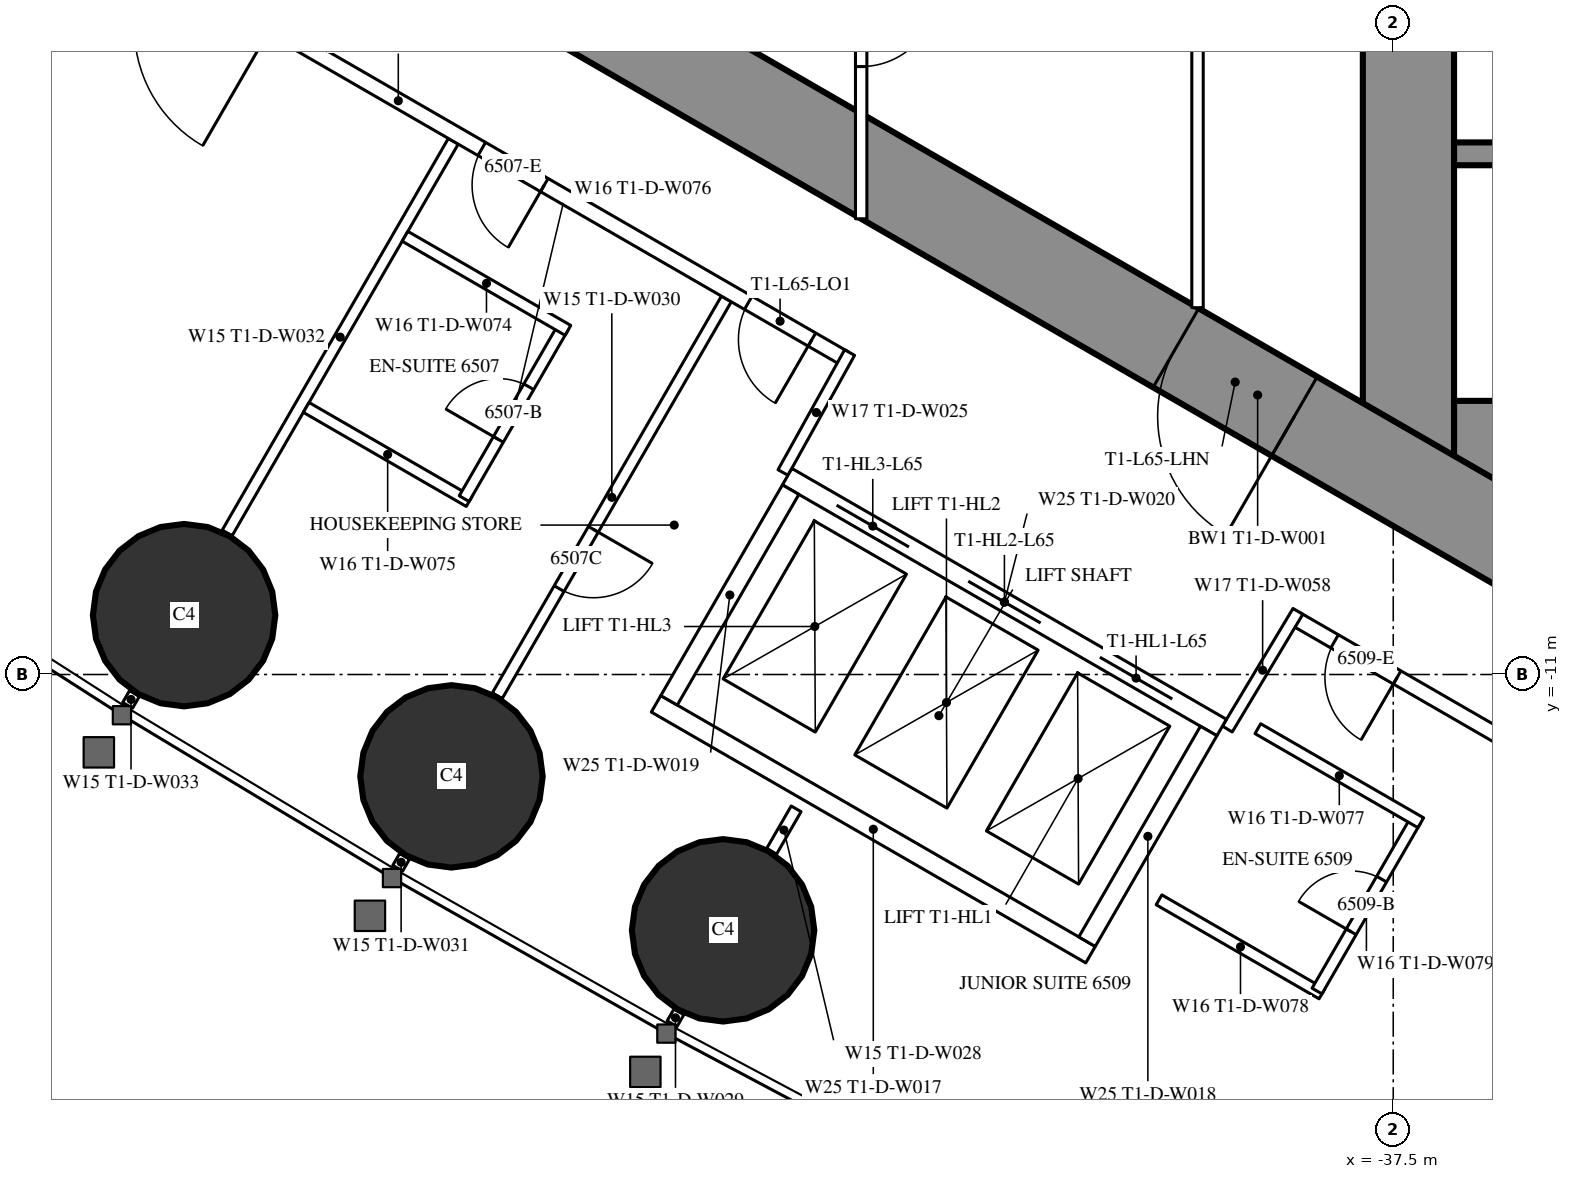
"""IFC4 building model, lengths in metres.
Left out: names, types, materials, properties, quantities, classifications, styles, units other than length and angle.
Written with IfcOpenShell. Run it as: python <this file> out.ifc"""

import sys

from ifc_helpers import new_model, si_unit, direction, frame, frame_2d, origin, origin_2d, place, context, subcontext, project, spatial, rectangle, circle, extrude, element, fill, save


model = new_model("IFC4")
c1 = context("Model", 3, precision=1e-05, world=origin(), true_north=direction((0.0, 1.0)))
c2 = subcontext(c1, "Body", "Model", "MODEL_VIEW")
j1 = project(units=[si_unit("LENGTHUNIT", "METRE"), si_unit("PLANEANGLEUNIT", "RADIAN")], contexts=[c1])
p1 = place(None, origin())
s1 = spatial("IfcSite", under=j1, at=p1, CompositionType="ELEMENT")
p2 = place(p1, origin())
s2 = spatial("IfcBuilding", under=s1, at=p2, CompositionType="ELEMENT")
p3 = place(p2, frame((0.0, 0.0, 244.1)))
s3 = spatial("IfcBuildingStorey", under=s2, at=p3, CompositionType="ELEMENT", Elevation=244.1)
for number, where, z_axis, x_axis in (
    (1, (-53.408, -10.219, 0.0), (0.0, 0.0, 1.0), (1.0, 0.0, 0.0)),
    (2, (-49.89, -12.34, 0.0), (0.0, 0.0, 1.0), (1.0, 0.0, 0.0)),
    (3, (-46.317, -14.365, 0.0), (0.0, 0.0, 1.0), (1.0, 0.0, 0.0)),
):
    element("IfcColumn", number, at=place(p3, frame(where, z_axis=z_axis, x_axis=x_axis)), inside=s3, PredefinedType="COLUMN", context=c2, shape_type="SweptSolid", body=[
        extrude(circle(Radius=1.2, at=origin_2d()), origin(), (0.0, 0.0, 1.0), 3.6),
    ])
p4 = place(p3, frame((-37.3, 8.6, 0.0), z_axis=(0.0, 0.0, 1.0), x_axis=(0.0, -1.0, 0.0)))
e4 = element("IfcWall", 4, at=p4, inside=s3, PredefinedType="SHEAR", context=c2, shape_type="SweptSolid", body=[
    extrude(rectangle(XDim=17.2, YDim=1.2, at=frame_2d((8.6, 0.0))), origin(), (0.0, 0.0, 1.0), 3.6),
])
p5 = place(p4, frame((7.7, 0.0, 0.0)))
e5 = element("IfcOpeningElement", 5, at=p5, cuts=e4, PredefinedType="OPENING", context=c2, shape_type="SweptSolid", body=[
    extrude(rectangle(XDim=1.8, YDim=2.2, at=frame_2d((0.9, 1.1))), frame((0.0, 0.61, 0.0), z_axis=(0.0, -1.0, 0.0), x_axis=(1.0, 0.0, 0.0)), (0.0, 0.0, 1.0), 1.22),
])
p6 = place(p3, frame((-28.3, -8.0, 0.0), z_axis=(0.0, 0.0, 1.0), x_axis=(-1.0, 0.0, 0.0)))
e6 = element("IfcWall", 6, at=p6, inside=s3, PredefinedType="SHEAR", context=c2, shape_type="SweptSolid", body=[
    extrude(rectangle(XDim=8.4, YDim=1.2, at=frame_2d((4.2, 0.0))), origin(), (0.0, 0.0, 1.0), 3.6),
])
p7 = place(p6, frame((0.25, 0.0, 0.0)))
e7 = element("IfcOpeningElement", 7, at=p7, cuts=e6, PredefinedType="OPENING", context=c2, shape_type="SweptSolid", body=[
    extrude(rectangle(XDim=1.0, YDim=2.2, at=frame_2d((0.5, 1.1))), frame((0.0, 0.61, 0.0), z_axis=(0.0, -1.0, 0.0), x_axis=(1.0, 0.0, 0.0)), (0.0, 0.0, 1.0), 1.22),
])
p8 = place(p3, frame((-28.3, -4.15, 0.0), z_axis=(0.0, 0.0, 1.0), x_axis=(-1.0, 0.0, 0.0)))
e8 = element("IfcWall", 8, at=p8, inside=s3, PredefinedType="SHEAR", context=c2, shape_type="SweptSolid", body=[
    extrude(rectangle(XDim=8.4, YDim=0.3, at=frame_2d((4.2, 0.0))), origin(), (0.0, 0.0, 1.0), 3.6),
])
p9 = place(p3, frame((-27.2, -14.3, 0.0), z_axis=(0.0, 0.0, 1.0), x_axis=(-0.866024021859, 0.500002393557, 0.0)))
e9 = element("IfcWall", 9, at=p9, inside=s3, PredefinedType="SHEAR", context=c2, shape_type="SweptSolid", body=[
    extrude(rectangle(XDim=27.907, YDim=1.2, at=frame_2d((13.954, 0.0))), origin(), (0.0, 0.0, 1.0), 3.6),
])
p10 = place(p9, frame((4.6, 0.0, 0.0)))
e10 = element("IfcOpeningElement", 10, at=p10, cuts=e9, PredefinedType="OPENING", context=c2, shape_type="SweptSolid", body=[
    extrude(rectangle(XDim=1.0, YDim=2.2, at=frame_2d((0.5, 1.1))), frame((0.0, 0.61, 0.0), z_axis=(0.0, -1.0, 0.0), x_axis=(1.0, 0.0, 0.0)), (0.0, 0.0, 1.0), 1.22),
])
p11 = place(p9, frame((13.395, 0.0, 0.0)))
e11 = element("IfcOpeningElement", 11, at=p11, cuts=e9, PredefinedType="OPENING", context=c2, shape_type="SweptSolid", body=[
    extrude(rectangle(XDim=1.8, YDim=2.2, at=frame_2d((0.9, 1.1))), frame((0.0, 0.61, 0.0), z_axis=(0.0, -1.0, 0.0), x_axis=(1.0, 0.0, 0.0)), (0.0, 0.0, 1.0), 1.22),
])
p12 = place(p3, frame((-46.898, -15.439, 0.0), z_axis=(0.0, 0.0, 1.0), x_axis=(-0.500232303069, -0.865891241997, 0.0)))
e12 = element("IfcWall", 12, at=p12, inside=s3, PredefinedType="PARTITIONING", context=c2, shape_type="SweptSolid", body=[
    extrude(rectangle(XDim=0.18, YDim=0.15, at=frame_2d((0.09, 0.0))), origin(), (0.0, 0.0, 1.0), 2.45),
])
p13 = place(p3, frame((-46.274, -6.059, 0.0), z_axis=(0.0, 0.0, 1.0), x_axis=(-0.500020471368, -0.866013584312, 0.0)))
e13 = element("IfcWall", 13, at=p13, inside=s3, PredefinedType="PARTITIONING", context=c2, shape_type="SweptSolid", body=[
    extrude(rectangle(XDim=6.028, YDim=0.15, at=frame_2d((3.014, 0.0))), origin(), (0.0, 0.0, 1.0), 2.45),
])
p14 = place(p13, frame((3.5, 0.0, 0.0)))
e14 = element("IfcOpeningElement", 14, at=p14, cuts=e13, PredefinedType="OPENING", context=c2, shape_type="SweptSolid", body=[
    extrude(rectangle(XDim=0.9, YDim=2.2, at=frame_2d((0.45, 1.1))), frame((0.0, 0.085, 0.0), z_axis=(0.0, -1.0, 0.0), x_axis=(1.0, 0.0, 0.0)), (0.0, 0.0, 1.0), 0.17),
])
p15 = place(p3, frame((-50.508, -13.392, 0.0), z_axis=(0.0, 0.0, 1.0), x_axis=(-0.499644091975, -0.866230789891, 0.0)))
e15 = element("IfcWall", 15, at=p15, inside=s3, PredefinedType="PARTITIONING", context=c2, shape_type="SweptSolid", body=[
    extrude(rectangle(XDim=0.18, YDim=0.15, at=frame_2d((0.09, 0.0))), origin(), (0.0, 0.0, 1.0), 2.45),
])
p16 = place(p3, frame((-49.866, -3.985, 0.0), z_axis=(0.0, 0.0, 1.0), x_axis=(-0.500000694566, -0.866025002776, 0.0)))
e16 = element("IfcWall", 16, at=p16, inside=s3, PredefinedType="PARTITIONING", context=c2, shape_type="SweptSolid", body=[
    extrude(rectangle(XDim=5.95, YDim=0.15, at=frame_2d((2.975, 0.0))), origin(), (0.0, 0.0, 1.0), 2.45),
])
p17 = place(p3, frame((-54.061, -11.25, 0.0), z_axis=(0.0, 0.0, 1.0), x_axis=(-0.500391173478, -0.865799441849, 0.0)))
e17 = element("IfcWall", 17, at=p17, inside=s3, PredefinedType="PARTITIONING", context=c2, shape_type="SweptSolid", body=[
    extrude(rectangle(XDim=0.179, YDim=0.15, at=frame_2d((0.089, 0.0))), origin(), (0.0, 0.0, 1.0), 2.45),
])
p18 = place(p3, frame((-45.356, -12.767, 0.0), z_axis=(0.0, 0.0, 1.0), x_axis=(-0.499886366516, -0.866091000168, 0.0)))
e18 = element("IfcWall", 18, at=p18, inside=s3, PredefinedType="PARTITIONING", context=c2, shape_type="SweptSolid", body=[
    extrude(rectangle(XDim=0.645, YDim=0.15, at=frame_2d((0.322, 0.0))), origin(), (0.0, 0.0, 1.0), 3.35),
])
p19 = place(p3, frame((-28.737, -16.068, 0.0), z_axis=(0.0, 0.0, 1.0), x_axis=(-0.866029399323, 0.49999307946, 0.0)))
e19 = element("IfcWall", 19, at=p19, inside=s3, PredefinedType="PARTITIONING", context=c2, shape_type="SweptSolid", body=[
    extrude(rectangle(XDim=11.61, YDim=0.2, at=frame_2d((5.805, 0.0))), origin(), (0.0, 0.0, 1.0), 3.35),
])
p20 = place(p19, frame((1.08, 0.0, 0.0)))
e20 = element("IfcOpeningElement", 20, at=p20, cuts=e19, PredefinedType="OPENING", context=c2, shape_type="SweptSolid", body=[
    extrude(rectangle(XDim=1.8, YDim=2.04, at=frame_2d((0.9, 1.02))), frame((0.0, 0.11, 0.0), z_axis=(0.0, -1.0, 0.0), x_axis=(1.0, 0.0, 0.0)), (0.0, 0.0, 1.0), 0.22),
])
p21 = place(p19, frame((10.06, 0.0, 0.0)))
e21 = element("IfcOpeningElement", 21, at=p21, cuts=e19, PredefinedType="OPENING", context=c2, shape_type="SweptSolid", body=[
    extrude(rectangle(XDim=0.95, YDim=2.2, at=frame_2d((0.475, 1.1))), frame((0.0, 0.11, 0.0), z_axis=(0.0, -1.0, 0.0), x_axis=(1.0, 0.0, 0.0)), (0.0, 0.0, 1.0), 0.22),
])
p22 = place(p3, frame((-44.715, -6.844, 0.0), z_axis=(0.0, 0.0, 1.0), x_axis=(-0.866025261224, 0.500000246922, 0.0)))
e22 = element("IfcWall", 22, at=p22, inside=s3, PredefinedType="PARTITIONING", context=c2, shape_type="SweptSolid", body=[
    extrude(rectangle(XDim=13.567, YDim=0.2, at=frame_2d((6.783, 0.0))), origin(), (0.0, 0.0, 1.0), 3.35),
])
p23 = place(p22, frame((8.716, 0.0, 0.0)))
e23 = element("IfcOpeningElement", 23, at=p23, cuts=e22, PredefinedType="OPENING", context=c2, shape_type="SweptSolid", body=[
    extrude(rectangle(XDim=1.8, YDim=2.2, at=frame_2d((0.9, 1.1))), frame((0.0, 0.11, 0.0), z_axis=(0.0, -1.0, 0.0), x_axis=(1.0, 0.0, 0.0)), (0.0, 0.0, 1.0), 0.22),
])
p24 = place(p22, frame((4.565, 0.0, 0.0)))
e24 = element("IfcOpeningElement", 24, at=p24, cuts=e22, PredefinedType="OPENING", context=c2, shape_type="SweptSolid", body=[
    extrude(rectangle(XDim=0.95, YDim=2.2, at=frame_2d((0.475, 1.1))), frame((0.0, 0.11, 0.0), z_axis=(0.0, -1.0, 0.0), x_axis=(1.0, 0.0, 0.0)), (0.0, 0.0, 1.0), 0.22),
])
p25 = place(p22, frame((0.5, 0.0, 0.0)))
e25 = element("IfcOpeningElement", 25, at=p25, cuts=e22, PredefinedType="OPENING", context=c2, shape_type="SweptSolid", body=[
    extrude(rectangle(XDim=0.967, YDim=2.2, at=frame_2d((0.483, 1.1))), frame((0.0, 0.11, 0.0), z_axis=(0.0, -1.0, 0.0), x_axis=(1.0, 0.0, 0.0)), (0.0, 0.0, 1.0), 0.22),
])
for number, where, z_axis, x_axis in (
    (26, (-39.683, -11.718, 0.0), (0.0, 0.0, 1.0), (0.514, 0.858, 0.0)),
    (27, (-44.652, -6.764, 0.0), (0.0, 0.0, 1.0), (-0.485, -0.874, 0.0)),
):
    element("IfcWall", number, at=place(p3, frame(where, z_axis=z_axis, x_axis=x_axis)), inside=s3, PredefinedType="PARTITIONING", context=c2, shape_type="SweptSolid", body=[
        extrude(rectangle(XDim=1.805, YDim=0.15, at=frame_2d((0.903, 0.0))), origin(), (0.0, 0.0, 1.0), 3.35),
    ])
p26 = place(p3, frame((-49.658, -8.724, 0.0), z_axis=(0.0, 0.0, 1.0), x_axis=(-0.866031185235, 0.4999899861, 0.0)))
e28 = element("IfcWall", 28, at=p26, inside=s3, PredefinedType="PARTITIONING", context=c2, shape_type="SweptSolid", body=[
    extrude(rectangle(XDim=2.475, YDim=0.15, at=frame_2d((1.238, 0.0))), origin(), (0.0, 0.0, 1.0), 3.35),
])
p27 = place(p3, frame((-48.423, -6.435, 0.0), z_axis=(0.0, 0.0, 1.0), x_axis=(-0.500006934395, -0.866021400173, 0.0)))
e29 = element("IfcWall", 29, at=p27, inside=s3, PredefinedType="PARTITIONING", context=c2, shape_type="SweptSolid", body=[
    extrude(rectangle(XDim=2.6, YDim=0.15, at=frame_2d((1.3, 0.0))), origin(), (0.0, 0.0, 1.0), 3.35),
])
p28 = place(p27, frame((0.9, 0.0, 0.0)))
e30 = element("IfcOpeningElement", 30, at=p28, cuts=e29, PredefinedType="OPENING", context=c2, shape_type="SweptSolid", body=[
    extrude(rectangle(XDim=0.8, YDim=2.2, at=frame_2d((0.4, 1.1))), frame((0.0, 0.085, 0.0), z_axis=(0.0, -1.0, 0.0), x_axis=(1.0, 0.0, 0.0)), (0.0, 0.0, 1.0), 0.17),
])
p29 = place(p3, frame((-48.358, -6.472, 0.0), z_axis=(0.0, 0.0, 1.0), x_axis=(-0.866073894602, 0.499916002032, 0.0)))
e31 = element("IfcWall", 31, at=p29, inside=s3, PredefinedType="PARTITIONING", context=c2, shape_type="SweptSolid", body=[
    extrude(rectangle(XDim=2.475, YDim=0.15, at=frame_2d((1.238, 0.0))), origin(), (0.0, 0.0, 1.0), 2.5),
])
p30 = place(p3, frame((-38.438, -15.202, 0.0), z_axis=(0.0, 0.0, 1.0), x_axis=(-0.866073894602, 0.499916002032, 0.0)))
e32 = element("IfcWall", 32, at=p30, inside=s3, PredefinedType="PARTITIONING", context=c2, shape_type="SweptSolid", body=[
    extrude(rectangle(XDim=2.475, YDim=0.15, at=frame_2d((1.238, 0.0))), origin(), (0.0, 0.0, 1.0), 3.35),
])
p31 = place(p3, frame((-37.203, -12.913, 0.0), z_axis=(0.0, 0.0, 1.0), x_axis=(-0.500006934395, -0.866021400173, 0.0)))
e33 = element("IfcWall", 33, at=p31, inside=s3, PredefinedType="PARTITIONING", context=c2, shape_type="SweptSolid", body=[
    extrude(rectangle(XDim=2.6, YDim=0.15, at=frame_2d((1.3, 0.0))), origin(), (0.0, 0.0, 1.0), 3.35),
])
p32 = place(p31, frame((0.9, 0.0, 0.0)))
e34 = element("IfcOpeningElement", 34, at=p32, cuts=e33, PredefinedType="OPENING", context=c2, shape_type="SweptSolid", body=[
    extrude(rectangle(XDim=0.8, YDim=2.2, at=frame_2d((0.4, 1.1))), frame((0.0, 0.085, 0.0), z_axis=(0.0, -1.0, 0.0), x_axis=(1.0, 0.0, 0.0)), (0.0, 0.0, 1.0), 0.17),
])
p33 = place(p3, frame((-37.138, -12.95, 0.0), z_axis=(0.0, 0.0, 1.0), x_axis=(-0.866031185235, 0.4999899861, 0.0)))
e35 = element("IfcWall", 35, at=p33, inside=s3, PredefinedType="PARTITIONING", context=c2, shape_type="SweptSolid", body=[
    extrude(rectangle(XDim=2.475, YDim=0.15, at=frame_2d((1.238, 0.0))), origin(), (0.0, 0.0, 1.0), 2.5),
])
p34 = place(p3, frame((-40.075, 6.174, 0.0), z_axis=(0.0, 0.0, 1.0), x_axis=(0.0, -1.0, 0.0)))
e36 = element("IfcWall", 36, at=p34, inside=s3, PredefinedType="PARTITIONING", context=c2, shape_type="SweptSolid", body=[
    extrude(rectangle(XDim=12.348, YDim=0.15, at=frame_2d((6.174, 0.0))), origin(), (0.0, 0.0, 1.0), 3.35),
])
p35 = place(p34, frame((5.274, 0.0, 0.0)))
e37 = element("IfcOpeningElement", 37, at=p35, cuts=e36, PredefinedType="OPENING", context=c2, shape_type="SweptSolid", body=[
    extrude(rectangle(XDim=1.8, YDim=2.2, at=frame_2d((0.9, 1.1))), frame((0.0, 0.085, 0.0), z_axis=(0.0, -1.0, 0.0), x_axis=(1.0, 0.0, 0.0)), (0.0, 0.0, 1.0), 0.17),
])
p36 = place(p3, frame((-44.5, 5.005, 0.0), z_axis=(0.0, 0.0, 1.0), x_axis=(0.0, -1.0, 0.0)))
e38 = element("IfcWall", 38, at=p36, inside=s3, PredefinedType="PARTITIONING", context=c2, shape_type="SweptSolid", body=[
    extrude(rectangle(XDim=10.009, YDim=0.15, at=frame_2d((5.005, 0.0))), origin(), (0.0, 0.0, 1.0), 2.5),
])
p37 = place(p36, frame((2.002, 0.0, 0.0)))
e39 = element("IfcOpeningElement", 39, at=p37, cuts=e38, PredefinedType="OPENING", context=c2, shape_type="SweptSolid", body=[
    extrude(rectangle(XDim=1.0, YDim=2.2, at=frame_2d((0.5, 1.1))), frame((0.0, 0.085, 0.0), z_axis=(0.0, -1.0, 0.0), x_axis=(1.0, 0.0, 0.0)), (0.0, 0.0, 1.0), 0.17),
])
p38 = place(p36, frame((7.007, 0.0, 0.0)))
e40 = element("IfcOpeningElement", 40, at=p38, cuts=e38, PredefinedType="OPENING", context=c2, shape_type="SweptSolid", body=[
    extrude(rectangle(XDim=1.0, YDim=2.2, at=frame_2d((0.5, 1.1))), frame((0.0, 0.085, 0.0), z_axis=(0.0, -1.0, 0.0), x_axis=(1.0, 0.0, 0.0)), (0.0, 0.0, 1.0), 0.17),
])
p39 = place(p3, frame((-39.758, -11.697, 0.0), z_axis=(0.0, 0.0, 1.0), x_axis=(-0.866024194504, 0.500002094529, 0.0)))
e41 = element("IfcWall", 41, at=p39, inside=s3, PredefinedType="PARTITIONING", context=c2, shape_type="SweptSolid", body=[
    extrude(rectangle(XDim=6.6, YDim=0.25, at=frame_2d((3.3, 0.0))), origin(), (0.0, 0.0, 1.0), 3.35),
])
p40 = place(p39, frame((0.75, 0.0, 0.0)))
e42 = element("IfcOpeningElement", 42, at=p40, cuts=e41, PredefinedType="OPENING", context=c2, shape_type="SweptSolid", body=[
    extrude(rectangle(XDim=1.1, YDim=2.2, at=frame_2d((0.55, 1.1))), frame((0.0, 0.135, 0.0), z_axis=(0.0, -1.0, 0.0), x_axis=(1.0, 0.0, 0.0)), (0.0, 0.0, 1.0), 0.27),
])
p41 = place(p39, frame((2.75, 0.0, 0.0)))
e43 = element("IfcOpeningElement", 43, at=p41, cuts=e41, PredefinedType="OPENING", context=c2, shape_type="SweptSolid", body=[
    extrude(rectangle(XDim=1.1, YDim=2.2, at=frame_2d((0.55, 1.1))), frame((0.0, 0.135, 0.0), z_axis=(0.0, -1.0, 0.0), x_axis=(1.0, 0.0, 0.0)), (0.0, 0.0, 1.0), 0.27),
])
p42 = place(p39, frame((4.75, 0.0, 0.0)))
e44 = element("IfcOpeningElement", 44, at=p42, cuts=e41, PredefinedType="OPENING", context=c2, shape_type="SweptSolid", body=[
    extrude(rectangle(XDim=1.1, YDim=2.2, at=frame_2d((0.55, 1.1))), frame((0.0, 0.135, 0.0), z_axis=(0.0, -1.0, 0.0), x_axis=(1.0, 0.0, 0.0)), (0.0, 0.0, 1.0), 0.27),
])
p43 = place(p3, frame((-41.482, -14.686, 0.0), z_axis=(0.0, 0.0, 1.0), x_axis=(-0.86603344179, 0.499986077507, 0.0)))
e45 = element("IfcWall", 45, at=p43, inside=s3, PredefinedType="PARTITIONING", context=c2, shape_type="SweptSolid", body=[
    extrude(rectangle(XDim=6.6, YDim=0.25, at=frame_2d((3.3, 0.0))), origin(), (0.0, 0.0, 1.0), 3.35),
])
for number, where, z_axis, x_axis in (
    (46, (-39.928, -11.743, 0.0), (0.0, 0.0, 1.0), (-0.5, -0.866, 0.0)),
    (47, (-45.428, -8.568, 0.0), (0.0, 0.0, 1.0), (-0.5, -0.866, 0.0)),
):
    element("IfcWall", number, at=place(p3, frame(where, z_axis=z_axis, x_axis=x_axis)), inside=s3, PredefinedType="PARTITIONING", context=c2, shape_type="SweptSolid", body=[
        extrude(rectangle(XDim=3.201, YDim=0.25, at=frame_2d((1.6, 0.0))), origin(), (0.0, 0.0, 1.0), 3.35),
    ])
p44 = place(p28, origin())
e48 = element("IfcDoor", 48, at=p44, inside=s3, OperationType="SINGLE_SWING_RIGHT", PredefinedType="DOOR", context=c2, shape_type="SweptSolid", body=[
    extrude(rectangle(XDim=0.8, YDim=2.2, at=frame_2d((0.4, 1.1))), frame((0.0, 0.025, 0.0), z_axis=(0.0, -1.0, 0.0), x_axis=(1.0, 0.0, 0.0)), (0.0, 0.0, 1.0), 0.05),
])
fill(e30, e48)
p45 = place(p24, origin())
e49 = element("IfcDoor", 49, at=p45, inside=s3, OperationType="SINGLE_SWING_LEFT", PredefinedType="DOOR", context=c2, shape_type="SweptSolid", body=[
    extrude(rectangle(XDim=0.95, YDim=2.2, at=frame_2d((0.475, 1.1))), frame((0.0, 0.025, 0.0), z_axis=(0.0, -1.0, 0.0), x_axis=(1.0, 0.0, 0.0)), (0.0, 0.0, 1.0), 0.05),
])
fill(e24, e49)
p46 = place(p32, origin())
e50 = element("IfcDoor", 50, at=p46, inside=s3, OperationType="SINGLE_SWING_RIGHT", PredefinedType="DOOR", context=c2, shape_type="SweptSolid", body=[
    extrude(rectangle(XDim=0.8, YDim=2.2, at=frame_2d((0.4, 1.1))), frame((0.0, 0.025, 0.0), z_axis=(0.0, -1.0, 0.0), x_axis=(1.0, 0.0, 0.0)), (0.0, 0.0, 1.0), 0.05),
])
fill(e34, e50)
p47 = place(p21, origin())
e51 = element("IfcDoor", 51, at=p47, inside=s3, OperationType="SINGLE_SWING_LEFT", PredefinedType="DOOR", context=c2, shape_type="SweptSolid", body=[
    extrude(rectangle(XDim=0.95, YDim=2.2, at=frame_2d((0.475, 1.1))), frame((0.0, 0.025, 0.0), z_axis=(0.0, -1.0, 0.0), x_axis=(1.0, 0.0, 0.0)), (0.0, 0.0, 1.0), 0.05),
])
fill(e21, e51)
p48 = place(p25, origin())
e52 = element("IfcDoor", 52, at=p48, inside=s3, OperationType="SINGLE_SWING_LEFT", PredefinedType="DOOR", context=c2, shape_type="SweptSolid", body=[
    extrude(rectangle(XDim=0.967, YDim=2.2, at=frame_2d((0.483, 1.1))), frame((0.0, 0.025, 0.0), z_axis=(0.0, -1.0, 0.0), x_axis=(1.0, 0.0, 0.0)), (0.0, 0.0, 1.0), 0.05),
])
fill(e25, e52)
p49 = place(p14, origin())
e53 = element("IfcDoor", 53, at=p49, inside=s3, OperationType="SINGLE_SWING_LEFT", PredefinedType="DOOR", context=c2, shape_type="SweptSolid", body=[
    extrude(rectangle(XDim=0.9, YDim=2.2, at=frame_2d((0.45, 1.1))), frame((0.0, 0.025, 0.0), z_axis=(0.0, -1.0, 0.0), x_axis=(1.0, 0.0, 0.0)), (0.0, 0.0, 1.0), 0.05),
])
fill(e14, e53)
p50 = place(p38, origin())
e54 = element("IfcDoor", 54, at=p50, inside=s3, OperationType="SINGLE_SWING_LEFT", PredefinedType="DOOR", context=c2, shape_type="SweptSolid", body=[
    extrude(rectangle(XDim=1.0, YDim=2.2, at=frame_2d((0.5, 1.1))), frame((0.0, 0.025, 0.0), z_axis=(0.0, -1.0, 0.0), x_axis=(1.0, 0.0, 0.0)), (0.0, 0.0, 1.0), 0.05),
])
fill(e40, e54)
p51 = place(p11, origin())
e55 = element("IfcDoor", 55, at=p51, inside=s3, OperationType="DOUBLE_DOOR_SINGLE_SWING", PredefinedType="DOOR", context=c2, shape_type="SweptSolid", body=[
    extrude(rectangle(XDim=1.8, YDim=2.2, at=frame_2d((0.9, 1.1))), frame((0.0, 0.025, 0.0), z_axis=(0.0, -1.0, 0.0), x_axis=(1.0, 0.0, 0.0)), (0.0, 0.0, 1.0), 0.05),
])
fill(e11, e55)
p52 = place(p40, origin())
e56 = element("IfcDoor", 56, at=p52, inside=s3, OperationType="DOUBLE_DOOR_SLIDING", PredefinedType="USERDEFINED", context=c2, shape_type="SweptSolid", body=[
    extrude(rectangle(XDim=1.1, YDim=2.2, at=frame_2d((0.55, 1.1))), frame((0.0, 0.025, 0.0), z_axis=(0.0, -1.0, 0.0), x_axis=(1.0, 0.0, 0.0)), (0.0, 0.0, 1.0), 0.05),
])
fill(e42, e56)
p53 = place(p41, origin())
e57 = element("IfcDoor", 57, at=p53, inside=s3, OperationType="DOUBLE_DOOR_SLIDING", PredefinedType="USERDEFINED", context=c2, shape_type="SweptSolid", body=[
    extrude(rectangle(XDim=1.1, YDim=2.2, at=frame_2d((0.55, 1.1))), frame((0.0, 0.025, 0.0), z_axis=(0.0, -1.0, 0.0), x_axis=(1.0, 0.0, 0.0)), (0.0, 0.0, 1.0), 0.05),
])
fill(e43, e57)
p54 = place(p42, origin())
e58 = element("IfcDoor", 58, at=p54, inside=s3, OperationType="DOUBLE_DOOR_SLIDING", PredefinedType="USERDEFINED", context=c2, shape_type="SweptSolid", body=[
    extrude(rectangle(XDim=1.1, YDim=2.2, at=frame_2d((0.55, 1.1))), frame((0.0, 0.025, 0.0), z_axis=(0.0, -1.0, 0.0), x_axis=(1.0, 0.0, 0.0)), (0.0, 0.0, 1.0), 0.05),
])
fill(e44, e58)
save(model, sys.argv[1])
